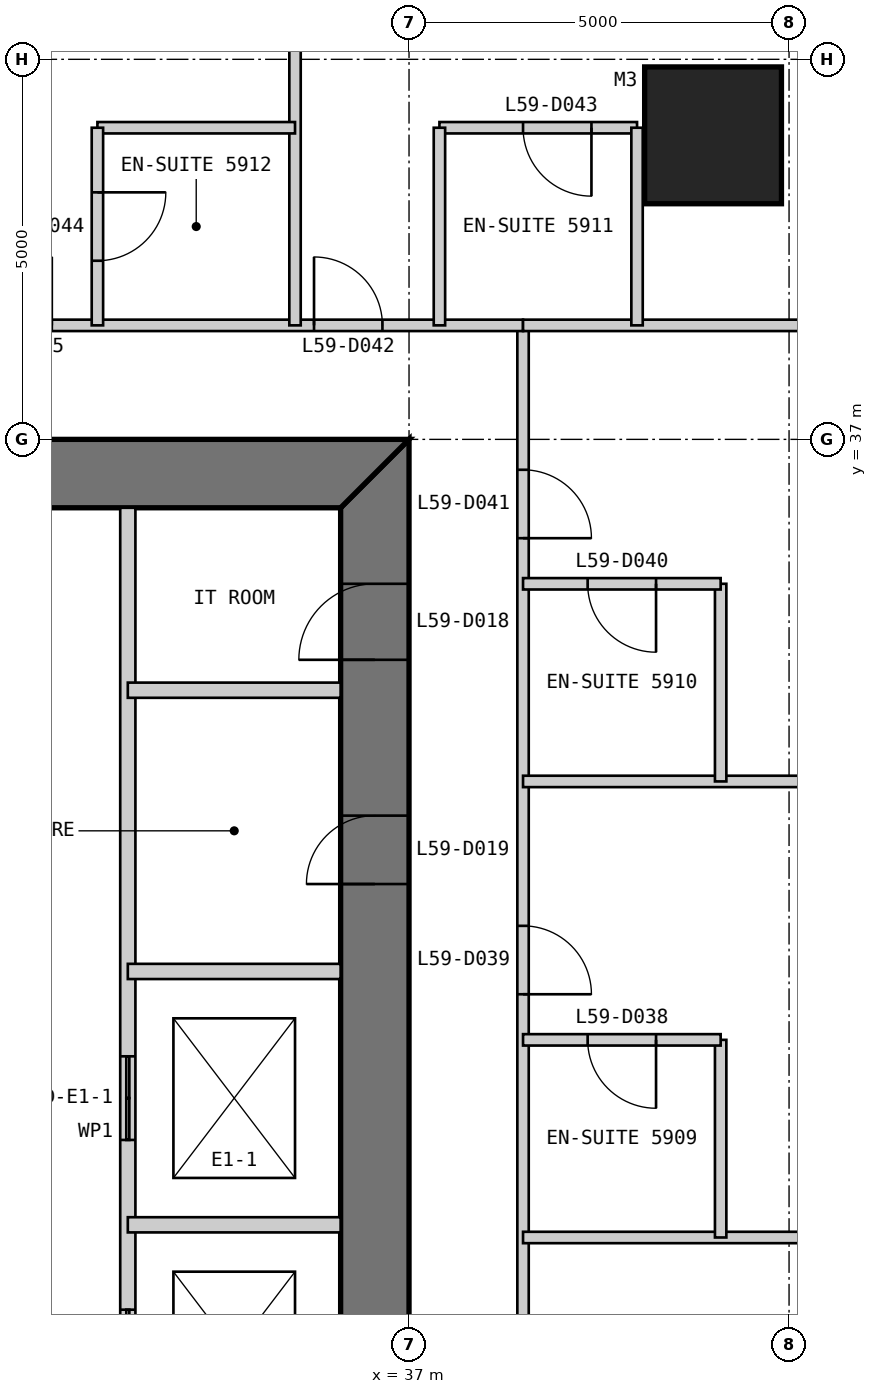
"""IFC4 building model, lengths in metres.
Left out: names, types, materials, properties, quantities, classifications, styles, units other than length and angle.
Written with IfcOpenShell. Run it as: python <this file> out.ifc"""

import sys

from ifc_helpers import new_model, si_unit, direction, frame, frame_2d, origin, origin_2d, place, context, subcontext, project, spatial, polyline, rectangle, outline, extrude, element, fill, save


model = new_model("IFC4")
c1 = context("Model", 3, precision=1e-05, world=origin(), true_north=direction((0.0, 1.0)))
c2 = subcontext(c1, "Body", "Model", "MODEL_VIEW")
j1 = project(units=[si_unit("LENGTHUNIT", "METRE"), si_unit("PLANEANGLEUNIT", "RADIAN")], contexts=[c1])
p1 = place(None, origin())
s1 = spatial("IfcSite", under=j1, at=p1, CompositionType="ELEMENT")
p2 = place(p1, origin())
s2 = spatial("IfcBuilding", under=s1, at=p2, CompositionType="ELEMENT")
p3 = place(p2, frame((0.0, 0.0, 252.6)))
s3 = spatial("IfcBuildingStorey", under=s2, at=p3, CompositionType="ELEMENT", Elevation=252.6)
p4 = place(p3, frame((41.0, 41.0, 0.0), z_axis=(0.0, 0.0, 1.0), x_axis=(1.0, 0.0, 0.0)))
e1 = element("IfcColumn", 1, at=p4, inside=s3, PredefinedType="COLUMN", context=c2, shape_type="SweptSolid", body=[
    extrude(rectangle(XDim=1.8, YDim=1.8, at=origin_2d()), origin(), (0.0, 0.0, 1.0), 3.4),
])
p5 = place(p3, frame((36.55, 13.9, 0.0), z_axis=(0.0, 0.0, 1.0), x_axis=(0.0, 1.0, 0.0)))
e2 = element("IfcWall", 2, at=p5, inside=s3, PredefinedType="SHEAR", context=c2, shape_type="SweptSolid", body=[
    extrude(outline(polyline([(-0.9, -0.45), (23.1, -0.45), (22.2, 0.45), (0.0, 0.45), (-0.9, -0.45)])), origin(), (0.0, 0.0, 1.0), 3.4),
])
p6 = place(p5, frame((20.2, 0.0, 0.0)))
e3 = element("IfcOpeningElement", 3, at=p6, cuts=e2, PredefinedType="OPENING", context=c2, shape_type="SweptSolid", body=[
    extrude(rectangle(XDim=1.0, YDim=2.2, at=frame_2d((0.5, 1.1))), frame((0.0, 0.46, 0.0), z_axis=(0.0, -1.0, 0.0), x_axis=(1.0, 0.0, 0.0)), (0.0, 0.0, 1.0), 0.92),
])
p7 = place(p5, frame((17.25, 0.0, 0.0)))
e4 = element("IfcOpeningElement", 4, at=p7, cuts=e2, PredefinedType="OPENING", context=c2, shape_type="SweptSolid", body=[
    extrude(rectangle(XDim=0.9, YDim=2.2, at=frame_2d((0.45, 1.1))), frame((0.0, 0.46, 0.0), z_axis=(0.0, -1.0, 0.0), x_axis=(1.0, 0.0, 0.0)), (0.0, 0.0, 1.0), 0.92),
])
p8 = place(p3, frame((37.0, 36.55, 0.0), z_axis=(0.0, 0.0, 1.0), x_axis=(-1.0, 0.0, 0.0)))
e5 = element("IfcWall", 5, at=p8, inside=s3, PredefinedType="SHEAR", context=c2, shape_type="SweptSolid", body=[
    extrude(outline(polyline([(0.0, -0.45), (24.0, -0.45), (23.1, 0.45), (0.9, 0.45), (0.0, -0.45)])), origin(), (0.0, 0.0, 1.0), 3.4),
])
p9 = place(p8, frame((4.9, 0.0, 0.0)))
e6 = element("IfcOpeningElement", 6, at=p9, cuts=e5, PredefinedType="OPENING", context=c2, shape_type="SweptSolid", body=[
    extrude(rectangle(XDim=1.0, YDim=2.2, at=frame_2d((0.5, 1.1))), frame((0.0, 0.46, 0.0), z_axis=(0.0, -1.0, 0.0), x_axis=(1.0, 0.0, 0.0)), (0.0, 0.0, 1.0), 0.92),
])
p10 = place(p8, frame((8.9, 0.0, 0.0)))
e7 = element("IfcOpeningElement", 7, at=p10, cuts=e5, PredefinedType="OPENING", context=c2, shape_type="SweptSolid", body=[
    extrude(rectangle(XDim=1.1, YDim=2.2, at=frame_2d((0.55, 1.1))), frame((0.0, 0.46, 0.0), z_axis=(0.0, -1.0, 0.0), x_axis=(1.0, 0.0, 0.0)), (0.0, 0.0, 1.0), 0.92),
])
p11 = place(p8, frame((15.05, 0.0, 0.0)))
e8 = element("IfcOpeningElement", 8, at=p11, cuts=e5, PredefinedType="OPENING", context=c2, shape_type="SweptSolid", body=[
    extrude(rectangle(XDim=0.9, YDim=2.2, at=frame_2d((0.45, 1.1))), frame((0.0, 0.46, 0.0), z_axis=(0.0, -1.0, 0.0), x_axis=(1.0, 0.0, 0.0)), (0.0, 0.0, 1.0), 0.92),
])
p12 = place(p8, frame((17.9, 0.0, 0.0)))
e9 = element("IfcOpeningElement", 9, at=p12, cuts=e5, PredefinedType="OPENING", context=c2, shape_type="SweptSolid", body=[
    extrude(rectangle(XDim=1.0, YDim=2.2, at=frame_2d((0.5, 1.1))), frame((0.0, 0.46, 0.0), z_axis=(0.0, -1.0, 0.0), x_axis=(1.0, 0.0, 0.0)), (0.0, 0.0, 1.0), 0.92),
])
p13 = place(p8, frame((21.4, 0.0, 0.0)))
e10 = element("IfcOpeningElement", 10, at=p13, cuts=e5, PredefinedType="OPENING", context=c2, shape_type="SweptSolid", body=[
    extrude(rectangle(XDim=1.0, YDim=2.2, at=frame_2d((0.5, 1.1))), frame((0.0, 0.46, 0.0), z_axis=(0.0, -1.0, 0.0), x_axis=(1.0, 0.0, 0.0)), (0.0, 0.0, 1.0), 0.92),
])
p14 = place(p3, frame((33.3, 36.1, 0.0), z_axis=(0.0, 0.0, 1.0), x_axis=(0.0, -1.0, 0.0)))
e11 = element("IfcWall", 11, at=p14, inside=s3, PredefinedType="PARTITIONING", context=c2, shape_type="SweptSolid", body=[
    extrude(rectangle(XDim=16.1, YDim=0.2, at=frame_2d((8.05, 0.0))), origin(), (0.0, 0.0, 1.0), 3.2),
])
p15 = place(p14, frame((7.217, 0.0, 0.0)))
e12 = element("IfcOpeningElement", 12, at=p15, cuts=e11, PredefinedType="OPENING", context=c2, shape_type="SweptSolid", body=[
    extrude(rectangle(XDim=1.1, YDim=2.2, at=frame_2d((0.55, 1.1))), frame((0.0, 0.11, 0.0), z_axis=(0.0, -1.0, 0.0), x_axis=(1.0, 0.0, 0.0)), (0.0, 0.0, 1.0), 0.22),
])
p16 = place(p14, frame((10.55, 0.0, 0.0)))
e13 = element("IfcOpeningElement", 13, at=p16, cuts=e11, PredefinedType="OPENING", context=c2, shape_type="SweptSolid", body=[
    extrude(rectangle(XDim=1.1, YDim=2.2, at=frame_2d((0.55, 1.1))), frame((0.0, 0.11, 0.0), z_axis=(0.0, -1.0, 0.0), x_axis=(1.0, 0.0, 0.0)), (0.0, 0.0, 1.0), 0.22),
])
p17 = place(p14, frame((13.883, 0.0, 0.0)))
e14 = element("IfcOpeningElement", 14, at=p17, cuts=e11, PredefinedType="OPENING", context=c2, shape_type="SweptSolid", body=[
    extrude(rectangle(XDim=1.1, YDim=2.2, at=frame_2d((0.55, 1.1))), frame((0.0, 0.11, 0.0), z_axis=(0.0, -1.0, 0.0), x_axis=(1.0, 0.0, 0.0)), (0.0, 0.0, 1.0), 0.22),
])
for number, where, z_axis, x_axis in (
    (15, (36.1, 30.0, 0.0), (0.0, 0.0, 1.0), (-1.0, 0.0, 0.0)),
    (16, (36.1, 26.667, 0.0), (0.0, 0.0, 1.0), (-1.0, 0.0, 0.0)),
    (17, (36.1, 33.7, 0.0), (0.0, 0.0, 1.0), (-1.0, 0.0, 0.0)),
):
    element("IfcWall", number, at=place(p3, frame(where, z_axis=z_axis, x_axis=x_axis)), inside=s3, PredefinedType="PARTITIONING", context=c2, shape_type="SweptSolid", body=[
        extrude(rectangle(XDim=2.8, YDim=0.2, at=frame_2d((1.4, 0.0))), origin(), (0.0, 0.0, 1.0), 3.2),
    ])
p18 = place(p3, frame((38.5, 11.5, 0.0), z_axis=(0.0, 0.0, 1.0), x_axis=(0.0, 1.0, 0.0)))
e18 = element("IfcWall", 18, at=p18, inside=s3, PredefinedType="PARTITIONING", context=c2, shape_type="SweptSolid", body=[
    extrude(rectangle(XDim=27.0, YDim=0.15, at=frame_2d((13.5, 0.0))), origin(), (0.0, 0.0, 1.0), 3.25),
])
p19 = place(p18, frame((1.85, 0.0, 0.0)))
e19 = element("IfcOpeningElement", 19, at=p19, cuts=e18, PredefinedType="OPENING", context=c2, shape_type="SweptSolid", body=[
    extrude(rectangle(XDim=0.9, YDim=2.1, at=frame_2d((0.45, 1.05))), frame((0.0, 0.085, 0.0), z_axis=(0.0, -1.0, 0.0), x_axis=(1.0, 0.0, 0.0)), (0.0, 0.0, 1.0), 0.17),
])
p20 = place(p18, frame((6.2, 0.0, 0.0)))
e20 = element("IfcOpeningElement", 20, at=p20, cuts=e18, PredefinedType="OPENING", context=c2, shape_type="SweptSolid", body=[
    extrude(rectangle(XDim=0.9, YDim=2.1, at=frame_2d((0.45, 1.05))), frame((0.0, 0.085, 0.0), z_axis=(0.0, -1.0, 0.0), x_axis=(1.0, 0.0, 0.0)), (0.0, 0.0, 1.0), 0.17),
])
p21 = place(p18, frame((12.2, 0.0, 0.0)))
e21 = element("IfcOpeningElement", 21, at=p21, cuts=e18, PredefinedType="OPENING", context=c2, shape_type="SweptSolid", body=[
    extrude(rectangle(XDim=0.9, YDim=2.1, at=frame_2d((0.45, 1.05))), frame((0.0, 0.085, 0.0), z_axis=(0.0, -1.0, 0.0), x_axis=(1.0, 0.0, 0.0)), (0.0, 0.0, 1.0), 0.17),
])
p22 = place(p18, frame((18.2, 0.0, 0.0)))
e22 = element("IfcOpeningElement", 22, at=p22, cuts=e18, PredefinedType="OPENING", context=c2, shape_type="SweptSolid", body=[
    extrude(rectangle(XDim=0.9, YDim=2.1, at=frame_2d((0.45, 1.05))), frame((0.0, 0.085, 0.0), z_axis=(0.0, -1.0, 0.0), x_axis=(1.0, 0.0, 0.0)), (0.0, 0.0, 1.0), 0.17),
])
p23 = place(p18, frame((24.2, 0.0, 0.0)))
e23 = element("IfcOpeningElement", 23, at=p23, cuts=e18, PredefinedType="OPENING", context=c2, shape_type="SweptSolid", body=[
    extrude(rectangle(XDim=0.9, YDim=2.1, at=frame_2d((0.45, 1.05))), frame((0.0, 0.085, 0.0), z_axis=(0.0, -1.0, 0.0), x_axis=(1.0, 0.0, 0.0)), (0.0, 0.0, 1.0), 0.17),
])
p24 = place(p3, frame((49.85, 26.5, 0.0), z_axis=(0.0, 0.0, 1.0), x_axis=(-1.0, 0.0, 0.0)))
e24 = element("IfcWall", 24, at=p24, inside=s3, PredefinedType="PARTITIONING", context=c2, shape_type="SweptSolid", body=[
    extrude(rectangle(XDim=11.35, YDim=0.15, at=frame_2d((5.675, 0.0))), origin(), (0.0, 0.0, 1.0), 3.25),
])
p25 = place(p3, frame((41.1, 26.5, 0.0), z_axis=(0.0, 0.0, 1.0), x_axis=(0.0, 1.0, 0.0)))
e25 = element("IfcWall", 25, at=p25, inside=s3, PredefinedType="PARTITIONING", context=c2, shape_type="SweptSolid", body=[
    extrude(rectangle(XDim=2.6, YDim=0.15, at=frame_2d((1.3, 0.0))), origin(), (0.0, 0.0, 1.0), 3.25),
])
p26 = place(p3, frame((41.1, 29.1, 0.0), z_axis=(0.0, 0.0, 1.0), x_axis=(-1.0, 0.0, 0.0)))
e26 = element("IfcWall", 26, at=p26, inside=s3, PredefinedType="PARTITIONING", context=c2, shape_type="SweptSolid", body=[
    extrude(rectangle(XDim=2.6, YDim=0.15, at=frame_2d((1.3, 0.0))), origin(), (0.0, 0.0, 1.0), 3.25),
])
p27 = place(p26, frame((0.85, 0.0, 0.0)))
e27 = element("IfcOpeningElement", 27, at=p27, cuts=e26, PredefinedType="OPENING", context=c2, shape_type="SweptSolid", body=[
    extrude(rectangle(XDim=0.9, YDim=2.1, at=frame_2d((0.45, 1.05))), frame((0.0, 0.085, 0.0), z_axis=(0.0, -1.0, 0.0), x_axis=(1.0, 0.0, 0.0)), (0.0, 0.0, 1.0), 0.17),
])
p28 = place(p3, frame((49.85, 32.5, 0.0), z_axis=(0.0, 0.0, 1.0), x_axis=(-1.0, 0.0, 0.0)))
e28 = element("IfcWall", 28, at=p28, inside=s3, PredefinedType="PARTITIONING", context=c2, shape_type="SweptSolid", body=[
    extrude(rectangle(XDim=11.35, YDim=0.15, at=frame_2d((5.675, 0.0))), origin(), (0.0, 0.0, 1.0), 3.25),
])
p29 = place(p3, frame((41.1, 32.5, 0.0), z_axis=(0.0, 0.0, 1.0), x_axis=(0.0, 1.0, 0.0)))
e29 = element("IfcWall", 29, at=p29, inside=s3, PredefinedType="PARTITIONING", context=c2, shape_type="SweptSolid", body=[
    extrude(rectangle(XDim=2.6, YDim=0.15, at=frame_2d((1.3, 0.0))), origin(), (0.0, 0.0, 1.0), 3.25),
])
p30 = place(p3, frame((41.1, 35.1, 0.0), z_axis=(0.0, 0.0, 1.0), x_axis=(-1.0, 0.0, 0.0)))
e30 = element("IfcWall", 30, at=p30, inside=s3, PredefinedType="PARTITIONING", context=c2, shape_type="SweptSolid", body=[
    extrude(rectangle(XDim=2.6, YDim=0.15, at=frame_2d((1.3, 0.0))), origin(), (0.0, 0.0, 1.0), 3.25),
])
p31 = place(p30, frame((0.85, 0.0, 0.0)))
e31 = element("IfcOpeningElement", 31, at=p31, cuts=e30, PredefinedType="OPENING", context=c2, shape_type="SweptSolid", body=[
    extrude(rectangle(XDim=0.9, YDim=2.1, at=frame_2d((0.45, 1.05))), frame((0.0, 0.085, 0.0), z_axis=(0.0, -1.0, 0.0), x_axis=(1.0, 0.0, 0.0)), (0.0, 0.0, 1.0), 0.17),
])
p32 = place(p3, frame((38.5, 38.5, 0.0), z_axis=(0.0, 0.0, 1.0), x_axis=(-1.0, 0.0, 0.0)))
e32 = element("IfcWall", 32, at=p32, inside=s3, PredefinedType="PARTITIONING", context=c2, shape_type="SweptSolid", body=[
    extrude(rectangle(XDim=27.0, YDim=0.15, at=frame_2d((13.5, 0.0))), origin(), (0.0, 0.0, 1.0), 3.25),
])
p33 = place(p32, frame((1.85, 0.0, 0.0)))
e33 = element("IfcOpeningElement", 33, at=p33, cuts=e32, PredefinedType="OPENING", context=c2, shape_type="SweptSolid", body=[
    extrude(rectangle(XDim=0.9, YDim=2.1, at=frame_2d((0.45, 1.05))), frame((0.0, 0.085, 0.0), z_axis=(0.0, -1.0, 0.0), x_axis=(1.0, 0.0, 0.0)), (0.0, 0.0, 1.0), 0.17),
])
p34 = place(p32, frame((6.2, 0.0, 0.0)))
e34 = element("IfcOpeningElement", 34, at=p34, cuts=e32, PredefinedType="OPENING", context=c2, shape_type="SweptSolid", body=[
    extrude(rectangle(XDim=0.9, YDim=2.1, at=frame_2d((0.45, 1.05))), frame((0.0, 0.085, 0.0), z_axis=(0.0, -1.0, 0.0), x_axis=(1.0, 0.0, 0.0)), (0.0, 0.0, 1.0), 0.17),
])
p35 = place(p32, frame((12.8, 0.0, 0.0)))
e35 = element("IfcOpeningElement", 35, at=p35, cuts=e32, PredefinedType="OPENING", context=c2, shape_type="SweptSolid", body=[
    extrude(rectangle(XDim=1.0, YDim=2.1, at=frame_2d((0.5, 1.05))), frame((0.0, 0.085, 0.0), z_axis=(0.0, -1.0, 0.0), x_axis=(1.0, 0.0, 0.0)), (0.0, 0.0, 1.0), 0.17),
])
p36 = place(p32, frame((18.2, 0.0, 0.0)))
e36 = element("IfcOpeningElement", 36, at=p36, cuts=e32, PredefinedType="OPENING", context=c2, shape_type="SweptSolid", body=[
    extrude(rectangle(XDim=0.9, YDim=2.1, at=frame_2d((0.45, 1.05))), frame((0.0, 0.085, 0.0), z_axis=(0.0, -1.0, 0.0), x_axis=(1.0, 0.0, 0.0)), (0.0, 0.0, 1.0), 0.17),
])
p37 = place(p32, frame((24.2, 0.0, 0.0)))
e37 = element("IfcOpeningElement", 37, at=p37, cuts=e32, PredefinedType="OPENING", context=c2, shape_type="SweptSolid", body=[
    extrude(rectangle(XDim=0.9, YDim=2.1, at=frame_2d((0.45, 1.05))), frame((0.0, 0.085, 0.0), z_axis=(0.0, -1.0, 0.0), x_axis=(1.0, 0.0, 0.0)), (0.0, 0.0, 1.0), 0.17),
])
p38 = place(p3, frame((49.85, 38.5, 0.0), z_axis=(0.0, 0.0, 1.0), x_axis=(-1.0, 0.0, 0.0)))
e38 = element("IfcWall", 38, at=p38, inside=s3, PredefinedType="PARTITIONING", context=c2, shape_type="SweptSolid", body=[
    extrude(rectangle(XDim=11.35, YDim=0.15, at=frame_2d((5.675, 0.0))), origin(), (0.0, 0.0, 1.0), 3.25),
])
p39 = place(p3, frame((40.0, 41.1, 0.0), z_axis=(0.0, 0.0, 1.0), x_axis=(-1.0, 0.0, 0.0)))
e39 = element("IfcWall", 39, at=p39, inside=s3, PredefinedType="PARTITIONING", context=c2, shape_type="SweptSolid", body=[
    extrude(rectangle(XDim=2.6, YDim=0.15, at=frame_2d((1.3, 0.0))), origin(), (0.0, 0.0, 1.0), 2.638),
])
p40 = place(p39, frame((0.6, 0.0, 0.0)))
e40 = element("IfcOpeningElement", 40, at=p40, cuts=e39, PredefinedType="OPENING", context=c2, shape_type="SweptSolid", body=[
    extrude(rectangle(XDim=0.9, YDim=2.1, at=frame_2d((0.45, 1.05))), frame((0.0, 0.085, 0.0), z_axis=(0.0, -1.0, 0.0), x_axis=(1.0, 0.0, 0.0)), (0.0, 0.0, 1.0), 0.17),
])
for number, where, z_axis, x_axis in (
    (41, (40.0, 41.1, 0.0), (0.0, 0.0, 1.0), (0.0, -1.0, 0.0)),
    (42, (37.4, 41.1, 0.0), (0.0, 0.0, 1.0), (0.0, -1.0, 0.0)),
):
    element("IfcWall", number, at=place(p3, frame(where, z_axis=z_axis, x_axis=x_axis)), inside=s3, PredefinedType="PARTITIONING", context=c2, shape_type="SweptSolid", body=[
        extrude(rectangle(XDim=2.6, YDim=0.15, at=frame_2d((1.3, 0.0))), origin(), (0.0, 0.0, 1.0), 3.25),
    ])
p41 = place(p3, frame((35.5, 49.85, 0.0), z_axis=(0.0, 0.0, 1.0), x_axis=(0.0, -1.0, 0.0)))
e43 = element("IfcWall", 43, at=p41, inside=s3, PredefinedType="PARTITIONING", context=c2, shape_type="SweptSolid", body=[
    extrude(rectangle(XDim=11.35, YDim=0.15, at=frame_2d((5.675, 0.0))), origin(), (0.0, 0.0, 1.0), 3.25),
])
p42 = place(p3, frame((35.5, 41.1, 0.0), z_axis=(0.0, 0.0, 1.0), x_axis=(-1.0, 0.0, 0.0)))
e44 = element("IfcWall", 44, at=p42, inside=s3, PredefinedType="PARTITIONING", context=c2, shape_type="SweptSolid", body=[
    extrude(rectangle(XDim=2.6, YDim=0.15, at=frame_2d((1.3, 0.0))), origin(), (0.0, 0.0, 1.0), 3.25),
])
p43 = place(p3, frame((32.9, 41.1, 0.0), z_axis=(0.0, 0.0, 1.0), x_axis=(0.0, -1.0, 0.0)))
e45 = element("IfcWall", 45, at=p43, inside=s3, PredefinedType="PARTITIONING", context=c2, shape_type="SweptSolid", body=[
    extrude(rectangle(XDim=2.6, YDim=0.15, at=frame_2d((1.3, 0.0))), origin(), (0.0, 0.0, 1.0), 3.25),
])
p44 = place(p43, frame((0.85, 0.0, 0.0)))
e46 = element("IfcOpeningElement", 46, at=p44, cuts=e45, PredefinedType="OPENING", context=c2, shape_type="SweptSolid", body=[
    extrude(rectangle(XDim=0.9, YDim=2.1, at=frame_2d((0.45, 1.05))), frame((0.0, 0.085, 0.0), z_axis=(0.0, -1.0, 0.0), x_axis=(1.0, 0.0, 0.0)), (0.0, 0.0, 1.0), 0.17),
])
p45 = place(p6, origin())
e47 = element("IfcDoor", 47, at=p45, inside=s3, OperationType="SINGLE_SWING_LEFT", PredefinedType="DOOR", context=c2, shape_type="SweptSolid", body=[
    extrude(rectangle(XDim=1.0, YDim=2.2, at=frame_2d((0.5, 1.1))), frame((0.0, 0.025, 0.0), z_axis=(0.0, -1.0, 0.0), x_axis=(1.0, 0.0, 0.0)), (0.0, 0.0, 1.0), 0.05),
    extrude(outline(polyline([(0.0, 0.0), (0.04, 0.0), (0.04, 2.16), (0.96, 2.16), (0.96, 0.0), (1.0, 0.0), (1.0, 2.2), (0.0, 2.2), (0.0, 0.0)])), frame((0.0, 0.3, 0.0), z_axis=(0.0, -1.0, 0.0), x_axis=(1.0, 0.0, 0.0)), (0.0, 0.0, 1.0), 0.6),
])
fill(e3, e47)
p46 = place(p7, origin())
e48 = element("IfcDoor", 48, at=p46, inside=s3, OperationType="SINGLE_SWING_LEFT", PredefinedType="DOOR", context=c2, shape_type="SweptSolid", body=[
    extrude(rectangle(XDim=0.9, YDim=2.2, at=frame_2d((0.45, 1.1))), frame((0.0, 0.025, 0.0), z_axis=(0.0, -1.0, 0.0), x_axis=(1.0, 0.0, 0.0)), (0.0, 0.0, 1.0), 0.05),
    extrude(outline(polyline([(0.0, 0.0), (0.04, 0.0), (0.04, 2.16), (0.86, 2.16), (0.86, 0.0), (0.9, 0.0), (0.9, 2.2), (0.0, 2.2), (0.0, 0.0)])), frame((0.0, 0.3, 0.0), z_axis=(0.0, -1.0, 0.0), x_axis=(1.0, 0.0, 0.0)), (0.0, 0.0, 1.0), 0.6),
])
fill(e4, e48)
p47 = place(p27, origin())
e49 = element("IfcDoor", 49, at=p47, inside=s3, OperationType="SINGLE_SWING_LEFT", PredefinedType="DOOR", context=c2, shape_type="SweptSolid", body=[
    extrude(rectangle(XDim=0.9, YDim=2.1, at=frame_2d((0.45, 1.05))), frame((0.0, 0.025, 0.0), z_axis=(0.0, -1.0, 0.0), x_axis=(1.0, 0.0, 0.0)), (0.0, 0.0, 1.0), 0.05),
])
fill(e27, e49)
p48 = place(p22, frame((0.9, 0.0, 0.0), z_axis=(0.0, 0.0, 1.0), x_axis=(-1.0, 0.0, 0.0)))
e50 = element("IfcDoor", 50, at=p48, inside=s3, OperationType="SINGLE_SWING_RIGHT", PredefinedType="DOOR", context=c2, shape_type="SweptSolid", body=[
    extrude(rectangle(XDim=0.9, YDim=2.1, at=frame_2d((0.45, 1.05))), frame((0.0, 0.025, 0.0), z_axis=(0.0, -1.0, 0.0), x_axis=(1.0, 0.0, 0.0)), (0.0, 0.0, 1.0), 0.05),
])
fill(e22, e50)
p49 = place(p31, origin())
e51 = element("IfcDoor", 51, at=p49, inside=s3, OperationType="SINGLE_SWING_LEFT", PredefinedType="DOOR", context=c2, shape_type="SweptSolid", body=[
    extrude(rectangle(XDim=0.9, YDim=2.1, at=frame_2d((0.45, 1.05))), frame((0.0, 0.025, 0.0), z_axis=(0.0, -1.0, 0.0), x_axis=(1.0, 0.0, 0.0)), (0.0, 0.0, 1.0), 0.05),
])
fill(e31, e51)
p50 = place(p23, frame((0.9, 0.0, 0.0), z_axis=(0.0, 0.0, 1.0), x_axis=(-1.0, 0.0, 0.0)))
e52 = element("IfcDoor", 52, at=p50, inside=s3, OperationType="SINGLE_SWING_RIGHT", PredefinedType="DOOR", context=c2, shape_type="SweptSolid", body=[
    extrude(rectangle(XDim=0.9, YDim=2.1, at=frame_2d((0.45, 1.05))), frame((0.0, 0.025, 0.0), z_axis=(0.0, -1.0, 0.0), x_axis=(1.0, 0.0, 0.0)), (0.0, 0.0, 1.0), 0.05),
])
fill(e23, e52)
p51 = place(p33, frame((0.9, 0.0, 0.0), z_axis=(0.0, 0.0, 1.0), x_axis=(-1.0, 0.0, 0.0)))
e53 = element("IfcDoor", 53, at=p51, inside=s3, OperationType="SINGLE_SWING_LEFT", PredefinedType="DOOR", context=c2, shape_type="SweptSolid", body=[
    extrude(rectangle(XDim=0.9, YDim=2.1, at=frame_2d((0.45, 1.05))), frame((0.0, 0.025, 0.0), z_axis=(0.0, -1.0, 0.0), x_axis=(1.0, 0.0, 0.0)), (0.0, 0.0, 1.0), 0.05),
])
fill(e33, e53)
p52 = place(p40, origin())
e54 = element("IfcDoor", 54, at=p52, inside=s3, OperationType="SINGLE_SWING_LEFT", PredefinedType="DOOR", context=c2, shape_type="SweptSolid", body=[
    extrude(rectangle(XDim=0.9, YDim=2.1, at=frame_2d((0.45, 1.05))), frame((0.0, 0.025, 0.0), z_axis=(0.0, -1.0, 0.0), x_axis=(1.0, 0.0, 0.0)), (0.0, 0.0, 1.0), 0.05),
])
fill(e40, e54)
p53 = place(p44, origin())
e55 = element("IfcDoor", 55, at=p53, inside=s3, OperationType="SINGLE_SWING_LEFT", PredefinedType="DOOR", context=c2, shape_type="SweptSolid", body=[
    extrude(rectangle(XDim=0.9, YDim=2.1, at=frame_2d((0.45, 1.05))), frame((0.0, 0.025, 0.0), z_axis=(0.0, -1.0, 0.0), x_axis=(1.0, 0.0, 0.0)), (0.0, 0.0, 1.0), 0.05),
])
fill(e46, e55)
p54 = place(p15, origin())
e56 = element("IfcDoor", 56, at=p54, inside=s3, OperationType="DOUBLE_DOOR_SLIDING", PredefinedType="DOOR", context=c2, shape_type="SweptSolid", body=[
    extrude(rectangle(XDim=1.1, YDim=2.2, at=frame_2d((0.55, 1.1))), frame((0.0, 0.025, 0.0), z_axis=(0.0, -1.0, 0.0), x_axis=(1.0, 0.0, 0.0)), (0.0, 0.0, 1.0), 0.05),
])
fill(e12, e56)
p55 = place(p16, origin())
e57 = element("IfcDoor", 57, at=p55, inside=s3, OperationType="DOUBLE_DOOR_SLIDING", PredefinedType="DOOR", context=c2, shape_type="SweptSolid", body=[
    extrude(rectangle(XDim=1.1, YDim=2.2, at=frame_2d((0.55, 1.1))), frame((0.0, 0.025, 0.0), z_axis=(0.0, -1.0, 0.0), x_axis=(1.0, 0.0, 0.0)), (0.0, 0.0, 1.0), 0.05),
])
fill(e13, e57)
save(model, sys.argv[1])
